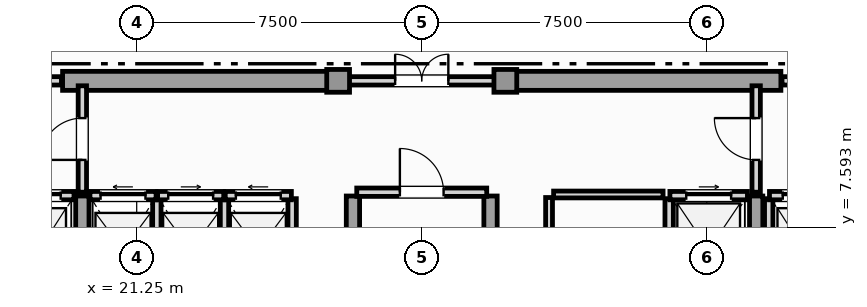
"""IFC4 building model, lengths in metres.
Left out: names, types, materials, properties, quantities, classifications, styles, units other than length and angle.
Written with IfcOpenShell. Run it as: python <this file> out.ifc"""

import sys

from ifc_helpers import new_model, si_unit, direction, frame, frame_2d, origin, origin_2d, place, context, subcontext, project, spatial, rectangle, extrude, element, fill, save


model = new_model("IFC4")
c1 = context("Model", 3, precision=1e-05, world=origin(), true_north=direction((0.0, 1.0)))
c2 = subcontext(c1, "Body", "Model", "MODEL_VIEW")
j1 = project(units=[si_unit("LENGTHUNIT", "METRE"), si_unit("PLANEANGLEUNIT", "RADIAN")], contexts=[c1])
p1 = place(None, origin())
s1 = spatial("IfcSite", under=j1, at=p1, CompositionType="ELEMENT")
p2 = place(p1, origin())
s2 = spatial("IfcBuilding", under=s1, at=p2, CompositionType="ELEMENT")
p3 = place(p2, frame((0.0, 0.0, 324.6)))
s3 = spatial("IfcBuildingStorey", under=s2, at=p3, CompositionType="ELEMENT", Elevation=324.6)
for number, where, z_axis, x_axis in (
    (1, (19.3, 11.45, 0.0), (0.0, 0.0, 1.0), (1.0, 0.0, 0.0)),
    (2, (30.9, 11.45, 0.0), (0.0, 0.0, 1.0), (1.0, 0.0, 0.0)),
):
    element("IfcWall", number, at=place(p3, frame(where, z_axis=z_axis, x_axis=x_axis)), inside=s3, PredefinedType="SHEAR", context=c2, shape_type="SweptSolid", body=[
        extrude(rectangle(XDim=7.3, YDim=0.5, at=frame_2d((3.65, 0.0))), origin(), (0.0, 0.0, 1.0), 3.65),
    ])
for number, where, z_axis, x_axis in (
    (3, (19.82, 0.92, 0.0), (0.0, 0.0, 1.0), (0.0, 1.0, 0.0)),
    (4, (26.94, 0.92, 0.0), (0.0, 0.0, 1.0), (0.0, 1.0, 0.0)),
    (5, (30.56, 0.92, 0.0), (0.0, 0.0, 1.0), (0.0, 1.0, 0.0)),
    (6, (37.55, 0.92, 0.0), (0.0, 0.0, 1.0), (0.0, 1.0, 0.0)),
):
    element("IfcWall", number, at=place(p3, frame(where, z_axis=z_axis, x_axis=x_axis)), inside=s3, PredefinedType="SHEAR", context=c2, shape_type="SweptSolid", body=[
        extrude(rectangle(XDim=7.5, YDim=0.35, at=frame_2d((3.75, 0.0))), origin(), (0.0, 0.0, 1.0), 3.65),
    ])
for number, where, z_axis, x_axis in (
    (7, (26.55, 11.45, 0.0), (0.0, 0.0, 1.0), (1.0, 0.0, 0.0)),
    (8, (30.95, 11.45, 0.0), (0.0, 0.0, 1.0), (1.0, 0.0, 0.0)),
):
    element("IfcColumn", number, at=place(p3, frame(where, z_axis=z_axis, x_axis=x_axis)), inside=s3, PredefinedType="COLUMN", context=c2, shape_type="SweptSolid", body=[
        extrude(rectangle(XDim=0.6, YDim=0.6, at=origin_2d()), origin(), (0.0, 0.0, 1.0), 3.85),
    ])
p4 = place(p3, frame((17.78, 8.43, 0.0), z_axis=(0.0, 0.0, 1.0), x_axis=(1.0, 0.0, 0.0)))
e9 = element("IfcWall", 9, at=p4, inside=s3, PredefinedType="SOLIDWALL", context=c2, shape_type="SweptSolid", body=[
    extrude(rectangle(XDim=1.82, YDim=0.22, at=frame_2d((0.91, 0.0))), origin(), (0.0, 0.0, 1.0), 3.65),
])
p5 = place(p4, frame((0.35, 0.0, 0.0)))
e10 = element("IfcOpeningElement", 10, at=p5, cuts=e9, PredefinedType="OPENING", context=c2, shape_type="SweptSolid", body=[
    extrude(rectangle(XDim=1.12, YDim=2.25, at=frame_2d((0.56, 1.125))), frame((0.0, 0.12, 0.0), z_axis=(0.0, -1.0, 0.0), x_axis=(1.0, 0.0, 0.0)), (0.0, 0.0, 1.0), 0.24),
])
p6 = place(p3, frame((37.88, 5.65, 0.0), z_axis=(0.0, 0.0, 1.0), x_axis=(0.0, 1.0, 0.0)))
e11 = element("IfcWall", 11, at=p6, inside=s3, PredefinedType="SOLIDWALL", context=c2, shape_type="SweptSolid", body=[
    extrude(rectangle(XDim=2.7, YDim=0.22, at=frame_2d((1.35, 0.0))), origin(), (0.0, 0.0, 1.0), 3.65),
])
p7 = place(p3, frame((37.9, 8.43, 0.0), z_axis=(0.0, 0.0, 1.0), x_axis=(1.0, 0.0, 0.0)))
e12 = element("IfcWall", 12, at=p7, inside=s3, PredefinedType="SOLIDWALL", context=c2, shape_type="SweptSolid", body=[
    extrude(rectangle(XDim=1.82, YDim=0.22, at=frame_2d((0.91, 0.0))), origin(), (0.0, 0.0, 1.0), 3.65),
])
p8 = place(p7, frame((0.35, 0.0, 0.0)))
e13 = element("IfcOpeningElement", 13, at=p8, cuts=e12, PredefinedType="OPENING", context=c2, shape_type="SweptSolid", body=[
    extrude(rectangle(XDim=1.12, YDim=2.25, at=frame_2d((0.56, 1.125))), frame((0.0, 0.12, 0.0), z_axis=(0.0, -1.0, 0.0), x_axis=(1.0, 0.0, 0.0)), (0.0, 0.0, 1.0), 0.24),
])
p9 = place(p3, frame((35.26, 5.65, 0.0), z_axis=(0.0, 0.0, 1.0), x_axis=(0.0, 1.0, 0.0)))
e14 = element("IfcWall", 14, at=p9, inside=s3, PredefinedType="SOLIDWALL", context=c2, shape_type="SweptSolid", body=[
    extrude(rectangle(XDim=2.7, YDim=0.22, at=frame_2d((1.35, 0.0))), origin(), (0.0, 0.0, 1.0), 3.65),
])
p10 = place(p3, frame((35.28, 8.43, 0.0), z_axis=(0.0, 0.0, 1.0), x_axis=(1.0, 0.0, 0.0)))
e15 = element("IfcWall", 15, at=p10, inside=s3, PredefinedType="SOLIDWALL", context=c2, shape_type="SweptSolid", body=[
    extrude(rectangle(XDim=2.04, YDim=0.22, at=frame_2d((1.02, 0.0))), origin(), (0.0, 0.0, 1.0), 3.65),
])
p11 = place(p10, frame((0.43, 0.0, 0.0)))
e16 = element("IfcOpeningElement", 16, at=p11, cuts=e15, PredefinedType="OPENING", context=c2, shape_type="SweptSolid", body=[
    extrude(rectangle(XDim=1.18, YDim=2.2, at=frame_2d((0.59, 1.1))), frame((0.0, 0.12, 0.0), z_axis=(0.0, -1.0, 0.0), x_axis=(1.0, 0.0, 0.0)), (0.0, 0.0, 1.0), 0.24),
])
p12 = place(p3, frame((21.78, 5.65, 0.0), z_axis=(0.0, 0.0, 1.0), x_axis=(0.0, 1.0, 0.0)))
e17 = element("IfcWall", 17, at=p12, inside=s3, PredefinedType="SOLIDWALL", context=c2, shape_type="SweptSolid", body=[
    extrude(rectangle(XDim=2.7, YDim=0.22, at=frame_2d((1.35, 0.0))), origin(), (0.0, 0.0, 1.0), 3.65),
])
p13 = place(p3, frame((20.02, 8.43, 0.0), z_axis=(0.0, 0.0, 1.0), x_axis=(1.0, 0.0, 0.0)))
e18 = element("IfcWall", 18, at=p13, inside=s3, PredefinedType="SOLIDWALL", context=c2, shape_type="SweptSolid", body=[
    extrude(rectangle(XDim=1.74, YDim=0.22, at=frame_2d((0.87, 0.0))), origin(), (0.0, 0.0, 1.0), 3.65),
])
p14 = place(p13, frame((0.28, 0.0, 0.0)))
e19 = element("IfcOpeningElement", 19, at=p14, cuts=e18, PredefinedType="OPENING", context=c2, shape_type="SweptSolid", body=[
    extrude(rectangle(XDim=1.18, YDim=2.2, at=frame_2d((0.59, 1.1))), frame((0.0, 0.12, 0.0), z_axis=(0.0, -1.0, 0.0), x_axis=(1.0, 0.0, 0.0)), (0.0, 0.0, 1.0), 0.24),
])
p15 = place(p3, frame((23.56, 5.65, 0.0), z_axis=(0.0, 0.0, 1.0), x_axis=(0.0, 1.0, 0.0)))
e20 = element("IfcWall", 20, at=p15, inside=s3, PredefinedType="SOLIDWALL", context=c2, shape_type="SweptSolid", body=[
    extrude(rectangle(XDim=2.7, YDim=0.22, at=frame_2d((1.35, 0.0))), origin(), (0.0, 0.0, 1.0), 3.65),
])
p16 = place(p3, frame((21.8, 8.43, 0.0), z_axis=(0.0, 0.0, 1.0), x_axis=(1.0, 0.0, 0.0)))
e21 = element("IfcWall", 21, at=p16, inside=s3, PredefinedType="SOLIDWALL", context=c2, shape_type="SweptSolid", body=[
    extrude(rectangle(XDim=1.74, YDim=0.22, at=frame_2d((0.87, 0.0))), origin(), (0.0, 0.0, 1.0), 3.65),
])
p17 = place(p16, frame((0.28, 0.0, 0.0)))
e22 = element("IfcOpeningElement", 22, at=p17, cuts=e21, PredefinedType="OPENING", context=c2, shape_type="SweptSolid", body=[
    extrude(rectangle(XDim=1.18, YDim=2.2, at=frame_2d((0.59, 1.1))), frame((0.0, 0.12, 0.0), z_axis=(0.0, -1.0, 0.0), x_axis=(1.0, 0.0, 0.0)), (0.0, 0.0, 1.0), 0.24),
])
p18 = place(p3, frame((25.34, 5.65, 0.0), z_axis=(0.0, 0.0, 1.0), x_axis=(0.0, 1.0, 0.0)))
e23 = element("IfcWall", 23, at=p18, inside=s3, PredefinedType="SOLIDWALL", context=c2, shape_type="SweptSolid", body=[
    extrude(rectangle(XDim=2.7, YDim=0.22, at=frame_2d((1.35, 0.0))), origin(), (0.0, 0.0, 1.0), 3.65),
])
p19 = place(p3, frame((23.58, 8.43, 0.0), z_axis=(0.0, 0.0, 1.0), x_axis=(1.0, 0.0, 0.0)))
e24 = element("IfcWall", 24, at=p19, inside=s3, PredefinedType="SOLIDWALL", context=c2, shape_type="SweptSolid", body=[
    extrude(rectangle(XDim=1.74, YDim=0.22, at=frame_2d((0.87, 0.0))), origin(), (0.0, 0.0, 1.0), 3.65),
])
p20 = place(p19, frame((0.28, 0.0, 0.0)))
e25 = element("IfcOpeningElement", 25, at=p20, cuts=e24, PredefinedType="OPENING", context=c2, shape_type="SweptSolid", body=[
    extrude(rectangle(XDim=1.18, YDim=2.2, at=frame_2d((0.59, 1.1))), frame((0.0, 0.12, 0.0), z_axis=(0.0, -1.0, 0.0), x_axis=(1.0, 0.0, 0.0)), (0.0, 0.0, 1.0), 0.24),
])
p21 = place(p3, frame((27.04, 8.52, 0.0), z_axis=(0.0, 0.0, 1.0), x_axis=(1.0, 0.0, 0.0)))
e26 = element("IfcWall", 26, at=p21, inside=s3, PredefinedType="SOLIDWALL", context=c2, shape_type="SweptSolid", body=[
    extrude(rectangle(XDim=3.42, YDim=0.22, at=frame_2d((1.71, 0.0))), origin(), (0.0, 0.0, 1.0), 3.65),
])
p22 = place(p21, frame((1.135, 0.0, 0.0)))
e27 = element("IfcOpeningElement", 27, at=p22, cuts=e26, PredefinedType="OPENING", context=c2, shape_type="SweptSolid", body=[
    extrude(rectangle(XDim=1.15, YDim=2.2, at=frame_2d((0.575, 1.1))), frame((0.0, 0.12, 0.0), z_axis=(0.0, -1.0, 0.0), x_axis=(1.0, 0.0, 0.0)), (0.0, 0.0, 1.0), 0.24),
])
p23 = place(p3, frame((19.82, 8.52, 0.0), z_axis=(0.0, 0.0, 1.0), x_axis=(0.0, 1.0, 0.0)))
e28 = element("IfcWall", 28, at=p23, inside=s3, PredefinedType="SOLIDWALL", context=c2, shape_type="SweptSolid", body=[
    extrude(rectangle(XDim=2.8, YDim=0.22, at=frame_2d((1.4, 0.0))), origin(), (0.0, 0.0, 1.0), 3.105),
])
p24 = place(p23, frame((0.85, 0.0, 0.0)))
e29 = element("IfcOpeningElement", 29, at=p24, cuts=e28, PredefinedType="OPENING", context=c2, shape_type="SweptSolid", body=[
    extrude(rectangle(XDim=1.1, YDim=2.2, at=frame_2d((0.55, 1.1))), frame((0.0, 0.12, 0.0), z_axis=(0.0, -1.0, 0.0), x_axis=(1.0, 0.0, 0.0)), (0.0, 0.0, 1.0), 0.24),
])
p25 = place(p3, frame((37.55, 8.52, 0.0), z_axis=(0.0, 0.0, 1.0), x_axis=(0.0, 1.0, 0.0)))
e30 = element("IfcWall", 30, at=p25, inside=s3, PredefinedType="SOLIDWALL", context=c2, shape_type="SweptSolid", body=[
    extrude(rectangle(XDim=2.8, YDim=0.22, at=frame_2d((1.4, 0.0))), origin(), (0.0, 0.0, 1.0), 3.105),
])
p26 = place(p25, frame((0.85, 0.0, 0.0)))
e31 = element("IfcOpeningElement", 31, at=p26, cuts=e30, PredefinedType="OPENING", context=c2, shape_type="SweptSolid", body=[
    extrude(rectangle(XDim=1.1, YDim=2.2, at=frame_2d((0.55, 1.1))), frame((0.0, 0.12, 0.0), z_axis=(0.0, -1.0, 0.0), x_axis=(1.0, 0.0, 0.0)), (0.0, 0.0, 1.0), 0.24),
])
p27 = place(p3, frame((16.23, 11.45, 0.0), z_axis=(0.0, 0.0, 1.0), x_axis=(1.0, 0.0, 0.0)))
e32 = element("IfcWall", 32, at=p27, inside=s3, PredefinedType="SOLIDWALL", context=c2, shape_type="SweptSolid", body=[
    extrude(rectangle(XDim=3.04, YDim=0.22, at=frame_2d((1.52, 0.0))), origin(), (0.0, 0.0, 1.0), 3.65),
])
p28 = place(p27, frame((0.97, 0.0, 0.0)))
e33 = element("IfcOpeningElement", 33, at=p28, cuts=e32, PredefinedType="OPENING", context=c2, shape_type="SweptSolid", body=[
    extrude(rectangle(XDim=1.1, YDim=2.2, at=frame_2d((0.55, 1.1))), frame((0.0, 0.12, 0.0), z_axis=(0.0, -1.0, 0.0), x_axis=(1.0, 0.0, 0.0)), (0.0, 0.0, 1.0), 0.24),
])
p29 = place(p3, frame((26.63, 11.45, 0.0), z_axis=(0.0, 0.0, 1.0), x_axis=(1.0, 0.0, 0.0)))
e34 = element("IfcWall", 34, at=p29, inside=s3, PredefinedType="SOLIDWALL", context=c2, shape_type="SweptSolid", body=[
    extrude(rectangle(XDim=4.24, YDim=0.22, at=frame_2d((2.12, 0.0))), origin(), (0.0, 0.0, 1.0), 3.65),
])
p30 = place(p29, frame((1.42, 0.0, 0.0)))
e35 = element("IfcOpeningElement", 35, at=p30, cuts=e34, PredefinedType="OPENING", context=c2, shape_type="SweptSolid", body=[
    extrude(rectangle(XDim=1.4, YDim=2.2, at=frame_2d((0.7, 1.1))), frame((0.0, 0.12, 0.0), z_axis=(0.0, -1.0, 0.0), x_axis=(1.0, 0.0, 0.0)), (0.0, 0.0, 1.0), 0.24),
])
p31 = place(p3, frame((38.23, 11.45, 0.0), z_axis=(0.0, 0.0, 1.0), x_axis=(1.0, 0.0, 0.0)))
e36 = element("IfcWall", 36, at=p31, inside=s3, PredefinedType="SOLIDWALL", context=c2, shape_type="SweptSolid", body=[
    extrude(rectangle(XDim=3.04, YDim=0.22, at=frame_2d((1.52, 0.0))), origin(), (0.0, 0.0, 1.0), 3.65),
])
p32 = place(p31, frame((0.97, 0.0, 0.0)))
e37 = element("IfcOpeningElement", 37, at=p32, cuts=e36, PredefinedType="OPENING", context=c2, shape_type="SweptSolid", body=[
    extrude(rectangle(XDim=1.1, YDim=2.2, at=frame_2d((0.55, 1.1))), frame((0.0, 0.12, 0.0), z_axis=(0.0, -1.0, 0.0), x_axis=(1.0, 0.0, 0.0)), (0.0, 0.0, 1.0), 0.24),
])
p33 = place(p3, frame((32.1, 5.65, 0.0), z_axis=(0.0, 0.0, 1.0), x_axis=(0.0, 1.0, 0.0)))
e38 = element("IfcWall", 38, at=p33, inside=s3, PredefinedType="PARTITIONING", context=c2, shape_type="SweptSolid", body=[
    extrude(rectangle(XDim=2.73, YDim=0.18, at=frame_2d((1.365, 0.0))), origin(), (0.0, 0.0, 1.0), 3.65),
])
p34 = place(p33, frame((0.84, 0.0, 0.0)))
e39 = element("IfcOpeningElement", 39, at=p34, cuts=e38, PredefinedType="OPENING", context=c2, shape_type="SweptSolid", body=[
    extrude(rectangle(XDim=1.05, YDim=2.15, at=frame_2d((0.525, 1.075))), frame((0.0, 0.1, 0.0), z_axis=(0.0, -1.0, 0.0), x_axis=(1.0, 0.0, 0.0)), (0.0, 0.0, 1.0), 0.2),
])
p35 = place(p3, frame((32.22, 8.46, 0.0), z_axis=(0.0, 0.0, 1.0), x_axis=(1.0, 0.0, 0.0)))
e40 = element("IfcWall", 40, at=p35, inside=s3, PredefinedType="PARTITIONING", context=c2, shape_type="SweptSolid", body=[
    extrude(rectangle(XDim=2.88, YDim=0.18, at=frame_2d((1.44, 0.0))), origin(), (0.0, 0.0, 1.0), 3.65),
])
p36 = place(p5, origin())
e41 = element("IfcDoor", 41, at=p36, inside=s3, OperationType="SLIDING_TO_RIGHT", PredefinedType="DOOR", context=c2, shape_type="SweptSolid", body=[
    extrude(rectangle(XDim=1.12, YDim=2.25, at=frame_2d((0.56, 1.125))), frame((0.0, 0.025, 0.0), z_axis=(0.0, -1.0, 0.0), x_axis=(1.0, 0.0, 0.0)), (0.0, 0.0, 1.0), 0.05),
])
fill(e10, e41)
p37 = place(p8, origin())
e42 = element("IfcDoor", 42, at=p37, inside=s3, OperationType="SLIDING_TO_LEFT", PredefinedType="DOOR", context=c2, shape_type="SweptSolid", body=[
    extrude(rectangle(XDim=1.12, YDim=2.25, at=frame_2d((0.56, 1.125))), frame((0.0, 0.025, 0.0), z_axis=(0.0, -1.0, 0.0), x_axis=(1.0, 0.0, 0.0)), (0.0, 0.0, 1.0), 0.05),
])
fill(e13, e42)
p38 = place(p11, origin())
e43 = element("IfcDoor", 43, at=p38, inside=s3, OperationType="SLIDING_TO_RIGHT", PredefinedType="DOOR", context=c2, shape_type="SweptSolid", body=[
    extrude(rectangle(XDim=1.18, YDim=2.2, at=frame_2d((0.59, 1.1))), frame((0.0, 0.025, 0.0), z_axis=(0.0, -1.0, 0.0), x_axis=(1.0, 0.0, 0.0)), (0.0, 0.0, 1.0), 0.05),
])
fill(e16, e43)
p39 = place(p14, origin())
e44 = element("IfcDoor", 44, at=p39, inside=s3, OperationType="SLIDING_TO_LEFT", PredefinedType="DOOR", context=c2, shape_type="SweptSolid", body=[
    extrude(rectangle(XDim=1.18, YDim=2.2, at=frame_2d((0.59, 1.1))), frame((0.0, 0.025, 0.0), z_axis=(0.0, -1.0, 0.0), x_axis=(1.0, 0.0, 0.0)), (0.0, 0.0, 1.0), 0.05),
])
fill(e19, e44)
p40 = place(p17, origin())
e45 = element("IfcDoor", 45, at=p40, inside=s3, OperationType="SLIDING_TO_RIGHT", PredefinedType="DOOR", context=c2, shape_type="SweptSolid", body=[
    extrude(rectangle(XDim=1.18, YDim=2.2, at=frame_2d((0.59, 1.1))), frame((0.0, 0.025, 0.0), z_axis=(0.0, -1.0, 0.0), x_axis=(1.0, 0.0, 0.0)), (0.0, 0.0, 1.0), 0.05),
])
fill(e22, e45)
p41 = place(p20, origin())
e46 = element("IfcDoor", 46, at=p41, inside=s3, OperationType="SLIDING_TO_LEFT", PredefinedType="DOOR", context=c2, shape_type="SweptSolid", body=[
    extrude(rectangle(XDim=1.18, YDim=2.2, at=frame_2d((0.59, 1.1))), frame((0.0, 0.025, 0.0), z_axis=(0.0, -1.0, 0.0), x_axis=(1.0, 0.0, 0.0)), (0.0, 0.0, 1.0), 0.05),
])
fill(e25, e46)
p42 = place(p22, origin())
e47 = element("IfcDoor", 47, at=p42, inside=s3, OperationType="SINGLE_SWING_LEFT", PredefinedType="DOOR", context=c2, shape_type="SweptSolid", body=[
    extrude(rectangle(XDim=1.15, YDim=2.2, at=frame_2d((0.575, 1.1))), frame((0.0, 0.025, 0.0), z_axis=(0.0, -1.0, 0.0), x_axis=(1.0, 0.0, 0.0)), (0.0, 0.0, 1.0), 0.05),
])
fill(e27, e47)
p43 = place(p24, origin())
e48 = element("IfcDoor", 48, at=p43, inside=s3, OperationType="SINGLE_SWING_LEFT", PredefinedType="DOOR", context=c2, shape_type="SweptSolid", body=[
    extrude(rectangle(XDim=1.1, YDim=2.2, at=frame_2d((0.55, 1.1))), frame((0.0, 0.025, 0.0), z_axis=(0.0, -1.0, 0.0), x_axis=(1.0, 0.0, 0.0)), (0.0, 0.0, 1.0), 0.05),
])
fill(e29, e48)
p44 = place(p26, origin())
e49 = element("IfcDoor", 49, at=p44, inside=s3, OperationType="SINGLE_SWING_RIGHT", PredefinedType="DOOR", context=c2, shape_type="SweptSolid", body=[
    extrude(rectangle(XDim=1.1, YDim=2.2, at=frame_2d((0.55, 1.1))), frame((0.0, 0.025, 0.0), z_axis=(0.0, -1.0, 0.0), x_axis=(1.0, 0.0, 0.0)), (0.0, 0.0, 1.0), 0.05),
])
fill(e31, e49)
p45 = place(p30, origin())
e50 = element("IfcDoor", 50, at=p45, inside=s3, OperationType="DOUBLE_DOOR_SINGLE_SWING", PredefinedType="DOOR", context=c2, shape_type="SweptSolid", body=[
    extrude(rectangle(XDim=1.4, YDim=2.2, at=frame_2d((0.7, 1.1))), frame((0.0, 0.025, 0.0), z_axis=(0.0, -1.0, 0.0), x_axis=(1.0, 0.0, 0.0)), (0.0, 0.0, 1.0), 0.05),
])
fill(e35, e50)
save(model, sys.argv[1])
